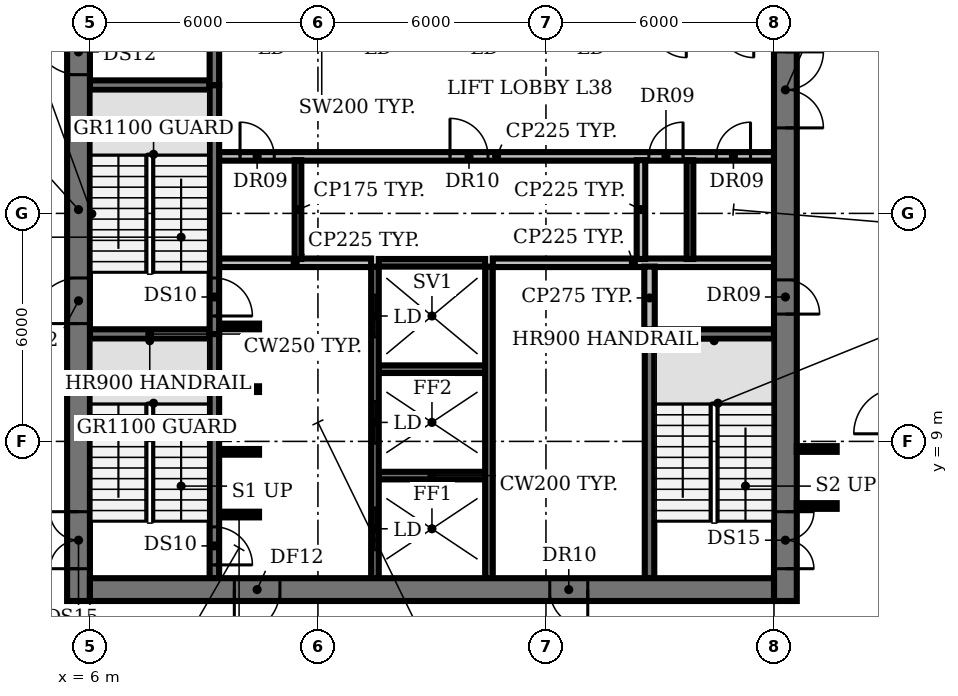
"""IFC4 building model, lengths in metres.
Left out: names, types, materials, properties, quantities, classifications, styles, units other than length and angle.
Written with IfcOpenShell. Run it as: python <this file> out.ifc"""

import sys

from ifc_helpers import new_model, si_unit, direction, frame, frame_2d, origin, place, context, subcontext, project, spatial, rectangle, extrude, element, fill, save


model = new_model("IFC4")
c1 = context("Model", 3, precision=1e-05, world=origin(), true_north=direction((0.0, 1.0)))
c2 = subcontext(c1, "Body", "Model", "MODEL_VIEW")
j1 = project(units=[si_unit("LENGTHUNIT", "METRE"), si_unit("PLANEANGLEUNIT", "RADIAN")], contexts=[c1])
p1 = place(None, origin())
s1 = spatial("IfcSite", under=j1, at=p1, CompositionType="ELEMENT")
p2 = place(p1, origin())
s2 = spatial("IfcBuilding", under=s1, at=p2, CompositionType="ELEMENT")
p3 = place(p2, frame((0.0, 0.0, 171.8)))
s3 = spatial("IfcBuildingStorey", under=s2, at=p3, CompositionType="ELEMENT", Elevation=171.8)
p4 = place(p3, frame((9.4, 7.075, 0.0), z_axis=(0.0, 0.0, 1.0), x_axis=(1.0, 0.0, 0.0)))
e1 = element("IfcWall", 1, at=p4, inside=s3, PredefinedType="SHEAR", context=c2, shape_type="SweptSolid", body=[
    extrude(rectangle(XDim=1.05, YDim=0.15, at=frame_2d((0.525, 0.0))), origin(), (0.0, 0.0, 1.0), 3.85),
])
p5 = place(p3, frame((13.6, 8.1, 0.0), z_axis=(0.0, 0.0, 1.0), x_axis=(1.0, 0.0, 0.0)))
e2 = element("IfcWall", 2, at=p5, inside=s3, PredefinedType="SHEAR", context=c2, shape_type="SweptSolid", body=[
    extrude(rectangle(XDim=2.8, YDim=0.2, at=frame_2d((1.4, 0.0))), origin(), (0.0, 0.0, 1.0), 3.85),
])
for number, where, z_axis, x_axis in (
    (3, (9.4, 8.725, 0.0), (0.0, 0.0, 1.0), (1.0, 0.0, 0.0)),
    (4, (9.4, 10.375, 0.0), (0.0, 0.0, 1.0), (1.0, 0.0, 0.0)),
):
    element("IfcWall", number, at=place(p3, frame(where, z_axis=z_axis, x_axis=x_axis)), inside=s3, PredefinedType="SHEAR", context=c2, shape_type="SweptSolid", body=[
        extrude(rectangle(XDim=1.05, YDim=0.15, at=frame_2d((0.525, 0.0))), origin(), (0.0, 0.0, 1.0), 3.85),
    ])
p6 = place(p3, frame((13.6, 10.9, 0.0), z_axis=(0.0, 0.0, 1.0), x_axis=(1.0, 0.0, 0.0)))
e5 = element("IfcWall", 5, at=p6, inside=s3, PredefinedType="SHEAR", context=c2, shape_type="SweptSolid", body=[
    extrude(rectangle(XDim=2.8, YDim=0.2, at=frame_2d((1.4, 0.0))), origin(), (0.0, 0.0, 1.0), 3.85),
])
for number, where, z_axis, x_axis in (
    (6, (6.0, 11.825, 0.0), (0.0, 0.0, 1.0), (1.0, 0.0, 0.0)),
    (7, (20.85, 11.825, 0.0), (0.0, 0.0, 1.0), (1.0, 0.0, 0.0)),
):
    element("IfcWall", number, at=place(p3, frame(where, z_axis=z_axis, x_axis=x_axis)), inside=s3, PredefinedType="SHEAR", context=c2, shape_type="SweptSolid", body=[
        extrude(rectangle(XDim=3.15, YDim=0.25, at=frame_2d((1.575, 0.0))), origin(), (0.0, 0.0, 1.0), 3.85),
    ])
p7 = place(p3, frame((9.4, 12.025, 0.0), z_axis=(0.0, 0.0, 1.0), x_axis=(1.0, 0.0, 0.0)))
e8 = element("IfcWall", 8, at=p7, inside=s3, PredefinedType="SHEAR", context=c2, shape_type="SweptSolid", body=[
    extrude(rectangle(XDim=1.05, YDim=0.15, at=frame_2d((0.525, 0.0))), origin(), (0.0, 0.0, 1.0), 3.85),
])
p8 = place(p3, frame((9.4, 13.7, 0.0), z_axis=(0.0, 0.0, 1.0), x_axis=(1.0, 0.0, 0.0)))
e9 = element("IfcWall", 9, at=p8, inside=s3, PredefinedType="PARTITIONING", context=c2, shape_type="SweptSolid", body=[
    extrude(rectangle(XDim=4.0, YDim=0.225, at=frame_2d((2.0, 0.0))), origin(), (0.0, 0.0, 1.0), 3.85),
])
p9 = place(p3, frame((13.6, 13.7, 0.0), z_axis=(0.0, 0.0, 1.0), x_axis=(1.0, 0.0, 0.0)))
e10 = element("IfcWall", 10, at=p9, inside=s3, PredefinedType="SHEAR", context=c2, shape_type="SweptSolid", body=[
    extrude(rectangle(XDim=2.8, YDim=0.2, at=frame_2d((1.4, 0.0))), origin(), (0.0, 0.0, 1.0), 3.85),
])
p10 = place(p3, frame((16.6, 13.7, 0.0), z_axis=(0.0, 0.0, 1.0), x_axis=(1.0, 0.0, 0.0)))
e11 = element("IfcWall", 11, at=p10, inside=s3, PredefinedType="PARTITIONING", context=c2, shape_type="SweptSolid", body=[
    extrude(rectangle(XDim=7.4, YDim=0.225, at=frame_2d((3.7, 0.0))), origin(), (0.0, 0.0, 1.0), 3.85),
])
p11 = place(p3, frame((9.4, 16.5, 0.0), z_axis=(0.0, 0.0, 1.0), x_axis=(1.0, 0.0, 0.0)))
e12 = element("IfcWall", 12, at=p11, inside=s3, PredefinedType="PARTITIONING", context=c2, shape_type="SweptSolid", body=[
    extrude(rectangle(XDim=14.6, YDim=0.225, at=frame_2d((7.3, 0.0))), origin(), (0.0, 0.0, 1.0), 3.85),
])
p12 = place(p11, frame((0.55, 0.0, 0.0)))
e13 = element("IfcOpeningElement", 13, at=p12, cuts=e12, PredefinedType="OPENING", context=c2, shape_type="SweptSolid", body=[
    extrude(rectangle(XDim=0.9, YDim=2.1, at=frame_2d((0.45, 1.05))), frame((0.0, 0.123, 0.0), z_axis=(0.0, -1.0, 0.0), x_axis=(1.0, 0.0, 0.0)), (0.0, 0.0, 1.0), 0.245),
])
p13 = place(p11, frame((6.075, 0.0, 0.0)))
e14 = element("IfcOpeningElement", 14, at=p13, cuts=e12, PredefinedType="OPENING", context=c2, shape_type="SweptSolid", body=[
    extrude(rectangle(XDim=1.0, YDim=2.1, at=frame_2d((0.5, 1.05))), frame((0.0, 0.123, 0.0), z_axis=(0.0, -1.0, 0.0), x_axis=(1.0, 0.0, 0.0)), (0.0, 0.0, 1.0), 0.245),
])
p14 = place(p11, frame((11.308, 0.0, 0.0)))
e15 = element("IfcOpeningElement", 15, at=p14, cuts=e12, PredefinedType="OPENING", context=c2, shape_type="SweptSolid", body=[
    extrude(rectangle(XDim=0.9, YDim=2.1, at=frame_2d((0.45, 1.05))), frame((0.0, 0.123, 0.0), z_axis=(0.0, -1.0, 0.0), x_axis=(1.0, 0.0, 0.0)), (0.0, 0.0, 1.0), 0.245),
])
p15 = place(p11, frame((13.083, 0.0, 0.0)))
e16 = element("IfcOpeningElement", 16, at=p15, cuts=e12, PredefinedType="OPENING", context=c2, shape_type="SweptSolid", body=[
    extrude(rectangle(XDim=0.9, YDim=2.1, at=frame_2d((0.45, 1.05))), frame((0.0, 0.123, 0.0), z_axis=(0.0, -1.0, 0.0), x_axis=(1.0, 0.0, 0.0)), (0.0, 0.0, 1.0), 0.245),
])
p16 = place(p3, frame((6.0, 18.375, 0.0), z_axis=(0.0, 0.0, 1.0), x_axis=(1.0, 0.0, 0.0)))
e17 = element("IfcWall", 17, at=p16, inside=s3, PredefinedType="SHEAR", context=c2, shape_type="SweptSolid", body=[
    extrude(rectangle(XDim=3.15, YDim=0.25, at=frame_2d((1.575, 0.0))), origin(), (0.0, 0.0, 1.0), 3.85),
])
p17 = place(p3, frame((9.275, 11.825, 0.0), z_axis=(0.0, 0.0, 1.0), x_axis=(0.0, -1.0, 0.0)))
e18 = element("IfcWall", 18, at=p17, inside=s3, PredefinedType="SHEAR", context=c2, shape_type="SweptSolid", body=[
    extrude(rectangle(XDim=6.425, YDim=0.25, at=frame_2d((3.212, 0.0))), origin(), (0.0, 0.0, 1.0), 3.85),
])
p18 = place(p17, frame((5.075, 0.0, 0.0)))
e19 = element("IfcOpeningElement", 19, at=p18, cuts=e18, PredefinedType="OPENING", context=c2, shape_type="SweptSolid", body=[
    extrude(rectangle(XDim=1.0, YDim=2.1, at=frame_2d((0.5, 1.05))), frame((0.0, 0.135, 0.0), z_axis=(0.0, -1.0, 0.0), x_axis=(1.0, 0.0, 0.0)), (0.0, 0.0, 1.0), 0.27),
])
p19 = place(p3, frame((9.275, 18.375, 0.0), z_axis=(0.0, 0.0, 1.0), x_axis=(0.0, -1.0, 0.0)))
e20 = element("IfcWall", 20, at=p19, inside=s3, PredefinedType="SHEAR", context=c2, shape_type="SweptSolid", body=[
    extrude(rectangle(XDim=6.55, YDim=0.25, at=frame_2d((3.275, 0.0))), origin(), (0.0, 0.0, 1.0), 3.85),
])
p20 = place(p19, frame((5.075, 0.0, 0.0)))
e21 = element("IfcOpeningElement", 21, at=p20, cuts=e20, PredefinedType="OPENING", context=c2, shape_type="SweptSolid", body=[
    extrude(rectangle(XDim=1.0, YDim=2.1, at=frame_2d((0.5, 1.05))), frame((0.0, 0.135, 0.0), z_axis=(0.0, -1.0, 0.0), x_axis=(1.0, 0.0, 0.0)), (0.0, 0.0, 1.0), 0.27),
])
p21 = place(p3, frame((9.275, 18.375, 0.0), z_axis=(0.0, 0.0, 1.0), x_axis=(0.0, 1.0, 0.0)))
e22 = element("IfcWall", 22, at=p21, inside=s3, PredefinedType="SHEAR", context=c2, shape_type="SweptSolid", body=[
    extrude(rectangle(XDim=6.425, YDim=0.25, at=frame_2d((3.212, 0.0))), origin(), (0.0, 0.0, 1.0), 3.85),
])
p22 = place(p3, frame((11.475, 13.8, 0.0), z_axis=(0.0, 0.0, 1.0), x_axis=(0.0, 1.0, 0.0)))
e23 = element("IfcWall", 23, at=p22, inside=s3, PredefinedType="PARTITIONING", context=c2, shape_type="SweptSolid", body=[
    extrude(rectangle(XDim=2.6, YDim=0.175, at=frame_2d((1.3, 0.0))), origin(), (0.0, 0.0, 1.0), 3.85),
])
p23 = place(p3, frame((13.5, 5.4, 0.0), z_axis=(0.0, 0.0, 1.0), x_axis=(0.0, 1.0, 0.0)))
e24 = element("IfcWall", 24, at=p23, inside=s3, PredefinedType="SHEAR", context=c2, shape_type="SweptSolid", body=[
    extrude(rectangle(XDim=8.2, YDim=0.2, at=frame_2d((4.1, 0.0))), origin(), (0.0, 0.0, 1.0), 3.85),
])
p24 = place(p23, frame((0.75, 0.0, 0.0)))
e25 = element("IfcOpeningElement", 25, at=p24, cuts=e24, PredefinedType="OPENING", context=c2, shape_type="SweptSolid", body=[
    extrude(rectangle(XDim=1.1, YDim=2.1, at=frame_2d((0.55, 1.05))), frame((0.0, 0.11, 0.0), z_axis=(0.0, -1.0, 0.0), x_axis=(1.0, 0.0, 0.0)), (0.0, 0.0, 1.0), 0.22),
])
p25 = place(p23, frame((3.55, 0.0, 0.0)))
e26 = element("IfcOpeningElement", 26, at=p25, cuts=e24, PredefinedType="OPENING", context=c2, shape_type="SweptSolid", body=[
    extrude(rectangle(XDim=1.1, YDim=2.1, at=frame_2d((0.55, 1.05))), frame((0.0, 0.11, 0.0), z_axis=(0.0, -1.0, 0.0), x_axis=(1.0, 0.0, 0.0)), (0.0, 0.0, 1.0), 0.22),
])
p26 = place(p23, frame((6.35, 0.0, 0.0)))
e27 = element("IfcOpeningElement", 27, at=p26, cuts=e24, PredefinedType="OPENING", context=c2, shape_type="SweptSolid", body=[
    extrude(rectangle(XDim=1.1, YDim=2.1, at=frame_2d((0.55, 1.05))), frame((0.0, 0.11, 0.0), z_axis=(0.0, -1.0, 0.0), x_axis=(1.0, 0.0, 0.0)), (0.0, 0.0, 1.0), 0.22),
])
p27 = place(p3, frame((16.5, 5.4, 0.0), z_axis=(0.0, 0.0, 1.0), x_axis=(0.0, 1.0, 0.0)))
e28 = element("IfcWall", 28, at=p27, inside=s3, PredefinedType="SHEAR", context=c2, shape_type="SweptSolid", body=[
    extrude(rectangle(XDim=8.2, YDim=0.2, at=frame_2d((4.1, 0.0))), origin(), (0.0, 0.0, 1.0), 3.85),
])
p28 = place(p3, frame((20.5, 13.8, 0.0), z_axis=(0.0, 0.0, 1.0), x_axis=(0.0, 1.0, 0.0)))
e29 = element("IfcWall", 29, at=p28, inside=s3, PredefinedType="PARTITIONING", context=c2, shape_type="SweptSolid", body=[
    extrude(rectangle(XDim=2.6, YDim=0.225, at=frame_2d((1.3, 0.0))), origin(), (0.0, 0.0, 1.0), 3.85),
])
p29 = place(p3, frame((20.725, 5.4, 0.0), z_axis=(0.0, 0.0, 1.0), x_axis=(0.0, 1.0, 0.0)))
e30 = element("IfcWall", 30, at=p29, inside=s3, PredefinedType="SHEAR", context=c2, shape_type="SweptSolid", body=[
    extrude(rectangle(XDim=6.3, YDim=0.25, at=frame_2d((3.15, 0.0))), origin(), (0.0, 0.0, 1.0), 3.85),
])
p30 = place(p3, frame((20.725, 11.95, 0.0), z_axis=(0.0, 0.0, 1.0), x_axis=(0.0, 1.0, 0.0)))
e31 = element("IfcWall", 31, at=p30, inside=s3, PredefinedType="PARTITIONING", context=c2, shape_type="SweptSolid", body=[
    extrude(rectangle(XDim=1.65, YDim=0.275, at=frame_2d((0.825, 0.0))), origin(), (0.0, 0.0, 1.0), 3.85),
])
p31 = place(p3, frame((21.79, 13.8, 0.0), z_axis=(0.0, 0.0, 1.0), x_axis=(0.0, 1.0, 0.0)))
e32 = element("IfcWall", 32, at=p31, inside=s3, PredefinedType="PARTITIONING", context=c2, shape_type="SweptSolid", body=[
    extrude(rectangle(XDim=2.6, YDim=0.175, at=frame_2d((1.3, 0.0))), origin(), (0.0, 0.0, 1.0), 3.85),
])
p32 = place(p3, frame((5.7, 4.8, 0.0), z_axis=(0.0, 0.0, 1.0), x_axis=(0.0, 1.0, 0.0)))
e33 = element("IfcWall", 33, at=p32, inside=s3, PredefinedType="SHEAR", context=c2, shape_type="SweptSolid", body=[
    extrude(rectangle(XDim=20.6, YDim=0.6, at=frame_2d((10.3, 0.0))), origin(), (0.0, 0.0, 1.0), 3.85),
])
p33 = place(p32, frame((0.85, 0.0, 0.0)))
e34 = element("IfcOpeningElement", 34, at=p33, cuts=e33, PredefinedType="OPENING", context=c2, shape_type="SweptSolid", body=[
    extrude(rectangle(XDim=1.5, YDim=2.1, at=frame_2d((0.75, 1.05))), frame((0.0, 0.31, 0.0), z_axis=(0.0, -1.0, 0.0), x_axis=(1.0, 0.0, 0.0)), (0.0, 0.0, 1.0), 0.62),
])
p34 = place(p32, frame((7.3, 0.0, 0.0)))
e35 = element("IfcOpeningElement", 35, at=p34, cuts=e33, PredefinedType="OPENING", context=c2, shape_type="SweptSolid", body=[
    extrude(rectangle(XDim=1.2, YDim=2.1, at=frame_2d((0.6, 1.05))), frame((0.0, 0.31, 0.0), z_axis=(0.0, -1.0, 0.0), x_axis=(1.0, 0.0, 0.0)), (0.0, 0.0, 1.0), 0.62),
])
p35 = place(p32, frame((13.85, 0.0, 0.0)))
e36 = element("IfcOpeningElement", 36, at=p35, cuts=e33, PredefinedType="OPENING", context=c2, shape_type="SweptSolid", body=[
    extrude(rectangle(XDim=1.2, YDim=2.1, at=frame_2d((0.6, 1.05))), frame((0.0, 0.31, 0.0), z_axis=(0.0, -1.0, 0.0), x_axis=(1.0, 0.0, 0.0)), (0.0, 0.0, 1.0), 0.62),
])
p36 = place(p3, frame((24.3, 25.555, 0.0), z_axis=(0.0, 0.0, 1.0), x_axis=(0.0, -1.0, 0.0)))
e37 = element("IfcWall", 37, at=p36, inside=s3, PredefinedType="SHEAR", context=c2, shape_type="SweptSolid", body=[
    extrude(rectangle(XDim=20.755, YDim=0.6, at=frame_2d((10.377, 0.0))), origin(), (0.0, 0.0, 1.0), 3.85),
])
p37 = place(p36, frame((18.405, 0.0, 0.0)))
e38 = element("IfcOpeningElement", 38, at=p37, cuts=e37, PredefinedType="OPENING", context=c2, shape_type="SweptSolid", body=[
    extrude(rectangle(XDim=1.5, YDim=2.1, at=frame_2d((0.75, 1.05))), frame((0.0, 0.31, 0.0), z_axis=(0.0, -1.0, 0.0), x_axis=(1.0, 0.0, 0.0)), (0.0, 0.0, 1.0), 0.62),
])
p38 = place(p36, frame((12.305, 0.0, 0.0)))
e39 = element("IfcOpeningElement", 39, at=p38, cuts=e37, PredefinedType="OPENING", context=c2, shape_type="SweptSolid", body=[
    extrude(rectangle(XDim=0.9, YDim=2.1, at=frame_2d((0.45, 1.05))), frame((0.0, 0.31, 0.0), z_axis=(0.0, -1.0, 0.0), x_axis=(1.0, 0.0, 0.0)), (0.0, 0.0, 1.0), 0.62),
])
p39 = place(p36, frame((6.305, 0.0, 0.0)))
e40 = element("IfcOpeningElement", 40, at=p39, cuts=e37, PredefinedType="OPENING", context=c2, shape_type="SweptSolid", body=[
    extrude(rectangle(XDim=2.0, YDim=2.1, at=frame_2d((1.0, 1.05))), frame((0.0, 0.31, 0.0), z_axis=(0.0, -1.0, 0.0), x_axis=(1.0, 0.0, 0.0)), (0.0, 0.0, 1.0), 0.62),
])
p40 = place(p3, frame((24.0, 5.1, 0.0), z_axis=(0.0, 0.0, 1.0), x_axis=(-1.0, 0.0, 0.0)))
e41 = element("IfcWall", 41, at=p40, inside=s3, PredefinedType="SHEAR", context=c2, shape_type="SweptSolid", body=[
    extrude(rectangle(XDim=18.0, YDim=0.6, at=frame_2d((9.0, 0.0))), origin(), (0.0, 0.0, 1.0), 3.85),
])
p41 = place(p40, frame((13.0, 0.0, 0.0)))
e42 = element("IfcOpeningElement", 42, at=p41, cuts=e41, PredefinedType="OPENING", context=c2, shape_type="SweptSolid", body=[
    extrude(rectangle(XDim=1.2, YDim=2.1, at=frame_2d((0.6, 1.05))), frame((0.0, 0.31, 0.0), z_axis=(0.0, -1.0, 0.0), x_axis=(1.0, 0.0, 0.0)), (0.0, 0.0, 1.0), 0.62),
])
p42 = place(p40, frame((4.9, 0.0, 0.0)))
e43 = element("IfcOpeningElement", 43, at=p42, cuts=e41, PredefinedType="OPENING", context=c2, shape_type="SweptSolid", body=[
    extrude(rectangle(XDim=1.0, YDim=2.1, at=frame_2d((0.5, 1.05))), frame((0.0, 0.31, 0.0), z_axis=(0.0, -1.0, 0.0), x_axis=(1.0, 0.0, 0.0)), (0.0, 0.0, 1.0), 0.62),
])
for number, where, z_axis, x_axis in (
    (44, (24.6, 7.3, 0.0), (0.0, 0.0, 1.0), (1.0, 0.0, 0.0)),
    (45, (24.6, 8.8, 0.0), (0.0, 0.0, 1.0), (1.0, 0.0, 0.0)),
):
    element("IfcWall", number, at=place(p3, frame(where, z_axis=z_axis, x_axis=x_axis)), inside=s3, PredefinedType="PARTITIONING", context=c2, shape_type="SweptSolid", body=[
        extrude(rectangle(XDim=1.05, YDim=0.15, at=frame_2d((0.525, 0.0))), origin(), (0.0, 0.0, 1.0), 2.88),
    ])
p43 = place(p12, origin())
e46 = element("IfcDoor", 46, at=p43, inside=s3, OperationType="SINGLE_SWING_LEFT", PredefinedType="DOOR", context=c2, shape_type="SweptSolid", body=[
    extrude(rectangle(XDim=0.9, YDim=2.1, at=frame_2d((0.45, 1.05))), frame((0.0, 0.025, 0.0), z_axis=(0.0, -1.0, 0.0), x_axis=(1.0, 0.0, 0.0)), (0.0, 0.0, 1.0), 0.05),
])
fill(e13, e46)
p44 = place(p13, origin())
e47 = element("IfcDoor", 47, at=p44, inside=s3, OperationType="SINGLE_SWING_LEFT", PredefinedType="DOOR", context=c2, shape_type="SweptSolid", body=[
    extrude(rectangle(XDim=1.0, YDim=2.1, at=frame_2d((0.5, 1.05))), frame((0.0, 0.025, 0.0), z_axis=(0.0, -1.0, 0.0), x_axis=(1.0, 0.0, 0.0)), (0.0, 0.0, 1.0), 0.05),
])
fill(e14, e47)
p45 = place(p14, origin())
e48 = element("IfcDoor", 48, at=p45, inside=s3, OperationType="SINGLE_SWING_RIGHT", PredefinedType="DOOR", context=c2, shape_type="SweptSolid", body=[
    extrude(rectangle(XDim=0.9, YDim=2.1, at=frame_2d((0.45, 1.05))), frame((0.0, 0.025, 0.0), z_axis=(0.0, -1.0, 0.0), x_axis=(1.0, 0.0, 0.0)), (0.0, 0.0, 1.0), 0.05),
])
fill(e15, e48)
p46 = place(p15, origin())
e49 = element("IfcDoor", 49, at=p46, inside=s3, OperationType="SINGLE_SWING_RIGHT", PredefinedType="DOOR", context=c2, shape_type="SweptSolid", body=[
    extrude(rectangle(XDim=0.9, YDim=2.1, at=frame_2d((0.45, 1.05))), frame((0.0, 0.025, 0.0), z_axis=(0.0, -1.0, 0.0), x_axis=(1.0, 0.0, 0.0)), (0.0, 0.0, 1.0), 0.05),
])
fill(e16, e49)
p47 = place(p18, origin())
e50 = element("IfcDoor", 50, at=p47, inside=s3, OperationType="SINGLE_SWING_RIGHT", PredefinedType="DOOR", context=c2, shape_type="SweptSolid", body=[
    extrude(rectangle(XDim=1.0, YDim=2.1, at=frame_2d((0.5, 1.05))), frame((0.0, 0.025, 0.0), z_axis=(0.0, -1.0, 0.0), x_axis=(1.0, 0.0, 0.0)), (0.0, 0.0, 1.0), 0.05),
])
fill(e19, e50)
p48 = place(p20, origin())
e51 = element("IfcDoor", 51, at=p48, inside=s3, OperationType="SINGLE_SWING_RIGHT", PredefinedType="DOOR", context=c2, shape_type="SweptSolid", body=[
    extrude(rectangle(XDim=1.0, YDim=2.1, at=frame_2d((0.5, 1.05))), frame((0.0, 0.025, 0.0), z_axis=(0.0, -1.0, 0.0), x_axis=(1.0, 0.0, 0.0)), (0.0, 0.0, 1.0), 0.05),
])
fill(e21, e51)
p49 = place(p24, origin())
e52 = element("IfcDoor", 52, at=p49, inside=s3, OperationType="DOUBLE_DOOR_SLIDING", PredefinedType="DOOR", context=c2, shape_type="SweptSolid", body=[
    extrude(rectangle(XDim=1.1, YDim=2.1, at=frame_2d((0.55, 1.05))), frame((0.0, 0.025, 0.0), z_axis=(0.0, -1.0, 0.0), x_axis=(1.0, 0.0, 0.0)), (0.0, 0.0, 1.0), 0.05),
])
fill(e25, e52)
p50 = place(p25, origin())
e53 = element("IfcDoor", 53, at=p50, inside=s3, OperationType="DOUBLE_DOOR_SLIDING", PredefinedType="DOOR", context=c2, shape_type="SweptSolid", body=[
    extrude(rectangle(XDim=1.1, YDim=2.1, at=frame_2d((0.55, 1.05))), frame((0.0, 0.025, 0.0), z_axis=(0.0, -1.0, 0.0), x_axis=(1.0, 0.0, 0.0)), (0.0, 0.0, 1.0), 0.05),
])
fill(e26, e53)
p51 = place(p26, origin())
e54 = element("IfcDoor", 54, at=p51, inside=s3, OperationType="DOUBLE_DOOR_SLIDING", PredefinedType="DOOR", context=c2, shape_type="SweptSolid", body=[
    extrude(rectangle(XDim=1.1, YDim=2.1, at=frame_2d((0.55, 1.05))), frame((0.0, 0.025, 0.0), z_axis=(0.0, -1.0, 0.0), x_axis=(1.0, 0.0, 0.0)), (0.0, 0.0, 1.0), 0.05),
])
fill(e27, e54)
p52 = place(p33, origin())
e55 = element("IfcDoor", 55, at=p52, inside=s3, OperationType="DOUBLE_DOOR_SINGLE_SWING", PredefinedType="DOOR", context=c2, shape_type="SweptSolid", body=[
    extrude(rectangle(XDim=1.5, YDim=2.1, at=frame_2d((0.75, 1.05))), frame((0.0, 0.025, 0.0), z_axis=(0.0, -1.0, 0.0), x_axis=(1.0, 0.0, 0.0)), (0.0, 0.0, 1.0), 0.05),
])
fill(e34, e55)
p53 = place(p34, origin())
e56 = element("IfcDoor", 56, at=p53, inside=s3, OperationType="SINGLE_SWING_LEFT", PredefinedType="DOOR", context=c2, shape_type="SweptSolid", body=[
    extrude(rectangle(XDim=1.2, YDim=2.1, at=frame_2d((0.6, 1.05))), frame((0.0, 0.025, 0.0), z_axis=(0.0, -1.0, 0.0), x_axis=(1.0, 0.0, 0.0)), (0.0, 0.0, 1.0), 0.05),
])
fill(e35, e56)
p54 = place(p35, origin())
e57 = element("IfcDoor", 57, at=p54, inside=s3, OperationType="SINGLE_SWING_RIGHT", PredefinedType="DOOR", context=c2, shape_type="SweptSolid", body=[
    extrude(rectangle(XDim=1.2, YDim=2.1, at=frame_2d((0.6, 1.05))), frame((0.0, 0.025, 0.0), z_axis=(0.0, -1.0, 0.0), x_axis=(1.0, 0.0, 0.0)), (0.0, 0.0, 1.0), 0.05),
])
fill(e36, e57)
p55 = place(p37, origin())
e58 = element("IfcDoor", 58, at=p55, inside=s3, OperationType="DOUBLE_DOOR_SINGLE_SWING", PredefinedType="DOOR", context=c2, shape_type="SweptSolid", body=[
    extrude(rectangle(XDim=1.5, YDim=2.1, at=frame_2d((0.75, 1.05))), frame((0.0, 0.025, 0.0), z_axis=(0.0, -1.0, 0.0), x_axis=(1.0, 0.0, 0.0)), (0.0, 0.0, 1.0), 0.05),
])
fill(e38, e58)
p56 = place(p38, origin())
e59 = element("IfcDoor", 59, at=p56, inside=s3, OperationType="SINGLE_SWING_RIGHT", PredefinedType="DOOR", context=c2, shape_type="SweptSolid", body=[
    extrude(rectangle(XDim=0.9, YDim=2.1, at=frame_2d((0.45, 1.05))), frame((0.0, -0.24, 0.0), z_axis=(0.0, -1.0, 0.0), x_axis=(1.0, 0.0, 0.0)), (0.0, 0.0, 1.0), 0.05),
])
fill(e39, e59)
p57 = place(p39, origin())
e60 = element("IfcDoor", 60, at=p57, inside=s3, OperationType="DOUBLE_DOOR_SINGLE_SWING", PredefinedType="DOOR", context=c2, shape_type="SweptSolid", body=[
    extrude(rectangle(XDim=2.0, YDim=2.1, at=frame_2d((1.0, 1.05))), frame((0.0, 0.025, 0.0), z_axis=(0.0, -1.0, 0.0), x_axis=(1.0, 0.0, 0.0)), (0.0, 0.0, 1.0), 0.05),
])
fill(e40, e60)
p58 = place(p41, origin())
e61 = element("IfcDoor", 61, at=p58, inside=s3, OperationType="SINGLE_SWING_RIGHT", PredefinedType="DOOR", context=c2, shape_type="SweptSolid", body=[
    extrude(rectangle(XDim=1.2, YDim=2.1, at=frame_2d((0.6, 1.05))), frame((0.0, 0.025, 0.0), z_axis=(0.0, -1.0, 0.0), x_axis=(1.0, 0.0, 0.0)), (0.0, 0.0, 1.0), 0.05),
])
fill(e42, e61)
p59 = place(p42, origin())
e62 = element("IfcDoor", 62, at=p59, inside=s3, OperationType="SINGLE_SWING_LEFT", PredefinedType="DOOR", context=c2, shape_type="SweptSolid", body=[
    extrude(rectangle(XDim=1.0, YDim=2.1, at=frame_2d((0.5, 1.05))), frame((0.0, -0.24, 0.0), z_axis=(0.0, -1.0, 0.0), x_axis=(1.0, 0.0, 0.0)), (0.0, 0.0, 1.0), 0.05),
])
fill(e43, e62)
save(model, sys.argv[1])
